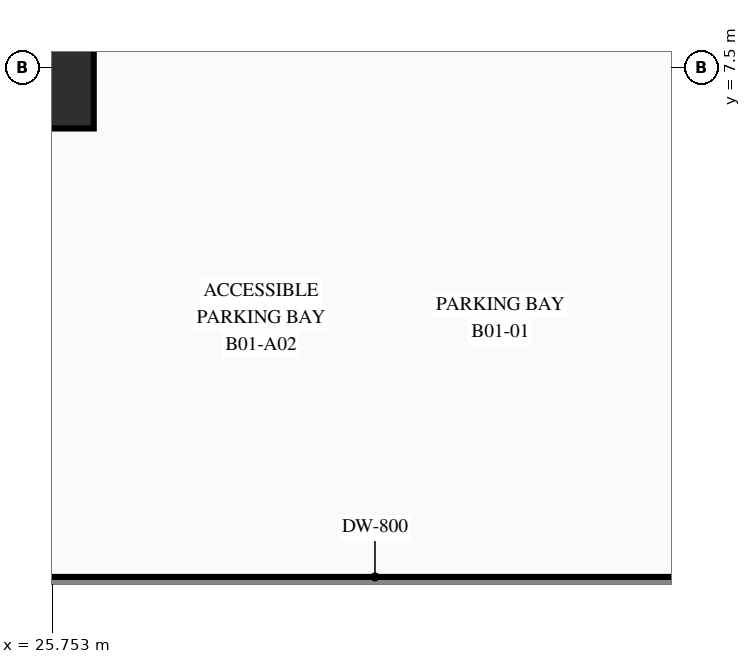
"""IFC4 building model, lengths in metres.
Left out: names, types, materials, properties, quantities, classifications, styles, units other than length and angle.
Written with IfcOpenShell. Run it as: python <this file> out.ifc"""

import sys

from ifc_helpers import new_model, si_unit, direction, frame, frame_2d, origin, origin_2d, place, context, subcontext, project, spatial, rectangle, extrude, element, save


model = new_model("IFC4")
c1 = context("Model", 3, precision=1e-05, world=origin(), true_north=direction((0.0, 1.0)))
c2 = subcontext(c1, "Body", "Model", "MODEL_VIEW")
j1 = project(units=[si_unit("LENGTHUNIT", "METRE"), si_unit("PLANEANGLEUNIT", "RADIAN")], contexts=[c1])
p1 = place(None, origin())
s1 = spatial("IfcSite", under=j1, at=p1, CompositionType="ELEMENT")
p2 = place(p1, origin())
s2 = spatial("IfcBuilding", under=s1, at=p2, CompositionType="ELEMENT")
p3 = place(p2, frame((0.0, 0.0, -4.5)))
s3 = spatial("IfcBuildingStorey", under=s2, at=p3, CompositionType="ELEMENT", Elevation=-4.5)
p4 = place(p3, frame((0.0, 0.4, 0.0), z_axis=(0.0, 0.0, 1.0), x_axis=(1.0, 0.0, 0.0)))
e1 = element("IfcWall", 1, at=p4, inside=s3, PredefinedType="USERDEFINED", context=c2, shape_type="SweptSolid", body=[
    extrude(rectangle(XDim=60.0, YDim=0.8, at=frame_2d((30.0, 0.0))), origin(), (0.0, 0.0, 1.0), 4.5),
])
p5 = place(p3, frame((25.5, 7.5, 0.0), z_axis=(0.0, 0.0, 1.0), x_axis=(1.0, 0.0, 0.0)))
e2 = element("IfcColumn", 2, at=p5, inside=s3, PredefinedType="COLUMN", context=c2, shape_type="SweptSolid", body=[
    extrude(rectangle(XDim=1.6, YDim=1.6, at=origin_2d()), origin(), (0.0, 0.0, 1.0), 4.5),
])
save(model, sys.argv[1])
